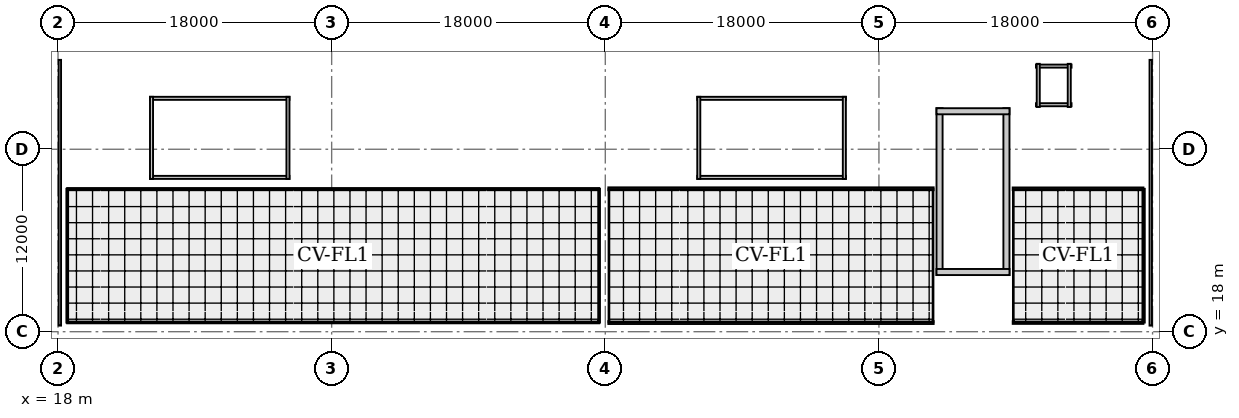
"""IFC4 building model, lengths in metres.
Left out: names, types, materials, properties, quantities, classifications, styles, units other than length and angle.
Written with IfcOpenShell. Run it as: python <this file> out.ifc"""

import sys

from ifc_helpers import new_model, si_unit, direction, frame, frame_2d, origin, origin_2d, place, context, subcontext, project, spatial, rectangle, circle, extrude, element, fill, save


model = new_model("IFC4")
c1 = context("Model", 3, precision=1e-05, world=origin(), true_north=direction((0.0, 1.0)))
c2 = subcontext(c1, "Body", "Model", "MODEL_VIEW")
j1 = project(units=[si_unit("LENGTHUNIT", "METRE"), si_unit("PLANEANGLEUNIT", "RADIAN")], contexts=[c1])
p1 = place(None, origin())
s1 = spatial("IfcSite", under=j1, at=p1, CompositionType="ELEMENT")
p2 = place(p1, origin())
s2 = spatial("IfcBuilding", under=s1, at=p2, CompositionType="ELEMENT")
p3 = place(p2, frame((0.0, 0.0, 10.8)))
s3 = spatial("IfcBuildingStorey", under=s2, at=p3, CompositionType="ELEMENT", Elevation=10.8)
for number, where, z_axis, x_axis in (
    (1, (18.0, 18.0, 0.0), (0.0, 0.0, 1.0), (1.0, 0.0, 0.0)),
    (2, (18.0, 30.0, 0.0), (0.0, 0.0, 1.0), (1.0, 0.0, 0.0)),
    (3, (18.0, 36.0, 0.0), (0.0, 0.0, 1.0), (1.0, 0.0, 0.0)),
    (4, (36.0, 18.0, 0.0), (0.0, 0.0, 1.0), (1.0, 0.0, 0.0)),
    (5, (36.0, 30.0, 0.0), (0.0, 0.0, 1.0), (1.0, 0.0, 0.0)),
    (6, (36.0, 36.0, 0.0), (0.0, 0.0, 1.0), (1.0, 0.0, 0.0)),
    (7, (54.0, 18.0, 0.0), (0.0, 0.0, 1.0), (1.0, 0.0, 0.0)),
    (8, (54.0, 30.0, 0.0), (0.0, 0.0, 1.0), (1.0, 0.0, 0.0)),
    (9, (54.0, 36.0, 0.0), (0.0, 0.0, 1.0), (1.0, 0.0, 0.0)),
    (10, (72.0, 18.0, 0.0), (0.0, 0.0, 1.0), (1.0, 0.0, 0.0)),
    (11, (72.0, 30.0, 0.0), (0.0, 0.0, 1.0), (1.0, 0.0, 0.0)),
    (12, (72.0, 36.0, 0.0), (0.0, 0.0, 1.0), (1.0, 0.0, 0.0)),
    (13, (90.0, 18.0, 0.0), (0.0, 0.0, 1.0), (1.0, 0.0, 0.0)),
    (14, (90.0, 30.0, 0.0), (0.0, 0.0, 1.0), (1.0, 0.0, 0.0)),
    (15, (90.0, 36.0, 0.0), (0.0, 0.0, 1.0), (1.0, 0.0, 0.0)),
):
    element("IfcColumn", number, at=place(p3, frame(where, z_axis=z_axis, x_axis=x_axis)), inside=s3, PredefinedType="COLUMN", context=c2, shape_type="SweptSolid", body=[
        extrude(circle(Radius=0.35, at=origin_2d()), origin(), (0.0, 0.0, 1.0), 3.35),
    ])
for number, where, z_axis, x_axis in (
    (16, (18.12, 18.4, 0.0), (0.0, 0.0, 1.0), (0.0, 1.0, 0.0)),
    (17, (89.88, 18.4, 0.0), (0.0, 0.0, 1.0), (0.0, 1.0, 0.0)),
):
    element("IfcWall", number, at=place(p3, frame(where, z_axis=z_axis, x_axis=x_axis)), inside=s3, PredefinedType="PARTITIONING", context=c2, shape_type="SweptSolid", body=[
        extrude(rectangle(XDim=17.48, YDim=0.16, at=frame_2d((8.74, 0.0))), origin(), (0.0, 0.0, 1.0), 2.15),
    ])
for number, where, z_axis, x_axis in (
    (18, (80.387, 21.725, 0.0), (0.0, 0.0, 1.0), (0.0, 1.0, 0.0)),
    (19, (75.988, 32.7, 0.0), (0.0, 0.0, 1.0), (0.0, -1.0, 0.0)),
):
    element("IfcWall", number, at=place(p3, frame(where, z_axis=z_axis, x_axis=x_axis)), inside=s3, PredefinedType="SHEAR", context=c2, shape_type="SweptSolid", body=[
        extrude(rectangle(XDim=10.975, YDim=0.4, at=frame_2d((5.487, 0.0))), origin(), (0.0, 0.0, 1.0), 3.3),
    ])
p4 = place(p3, frame((80.587, 32.5, 0.0), z_axis=(0.0, 0.0, 1.0), x_axis=(-1.0, 0.0, 0.0)))
e20 = element("IfcWall", 20, at=p4, inside=s3, PredefinedType="SHEAR", context=c2, shape_type="SweptSolid", body=[
    extrude(rectangle(XDim=4.8, YDim=0.4, at=frame_2d((2.4, 0.0))), origin(), (0.0, 0.0, 1.0), 3.3),
])
p5 = place(p3, frame((75.788, 21.925, 0.0), z_axis=(0.0, 0.0, 1.0), x_axis=(1.0, 0.0, 0.0)))
e21 = element("IfcWall", 21, at=p5, inside=s3, PredefinedType="SHEAR", context=c2, shape_type="SweptSolid", body=[
    extrude(rectangle(XDim=4.8, YDim=0.4, at=frame_2d((2.4, 0.0))), origin(), (0.0, 0.0, 1.0), 3.3),
])
p6 = place(p5, frame((1.1, 0.0, 0.0)))
e22 = element("IfcOpeningElement", 22, at=p6, cuts=e21, PredefinedType="OPENING", context=c2, shape_type="SweptSolid", body=[
    extrude(rectangle(XDim=1.3, YDim=2.1, at=frame_2d((0.65, 1.05))), frame((0.0, 0.21, 0.0), z_axis=(0.0, -1.0, 0.0), x_axis=(1.0, 0.0, 0.0)), (0.0, 0.0, 1.0), 0.42),
])
for number, where, z_axis, x_axis in (
    (23, (24.05, 28.15, 0.0), (0.0, 0.0, 1.0), (1.0, 0.0, 0.0)),
    (24, (33.225, 33.35, 0.0), (0.0, 0.0, 1.0), (-1.0, 0.0, 0.0)),
):
    element("IfcWall", number, at=place(p3, frame(where, z_axis=z_axis, x_axis=x_axis)), inside=s3, PredefinedType="SOLIDWALL", context=c2, shape_type="SweptSolid", body=[
        extrude(rectangle(XDim=9.175, YDim=0.2, at=frame_2d((4.587, 0.0))), origin(), (0.0, 0.0, 1.0), 2.45),
    ])
p7 = place(p3, frame((33.125, 28.05, 0.0), z_axis=(0.0, 0.0, 1.0), x_axis=(0.0, 1.0, 0.0)))
e25 = element("IfcWall", 25, at=p7, inside=s3, PredefinedType="SOLIDWALL", context=c2, shape_type="SweptSolid", body=[
    extrude(rectangle(XDim=5.4, YDim=0.2, at=frame_2d((2.7, 0.0))), origin(), (0.0, 0.0, 1.0), 2.45),
])
p8 = place(p3, frame((24.15, 33.45, 0.0), z_axis=(0.0, 0.0, 1.0), x_axis=(0.0, -1.0, 0.0)))
e26 = element("IfcWall", 26, at=p8, inside=s3, PredefinedType="SOLIDWALL", context=c2, shape_type="SweptSolid", body=[
    extrude(rectangle(XDim=5.4, YDim=0.2, at=frame_2d((2.7, 0.0))), origin(), (0.0, 0.0, 1.0), 2.45),
])
p9 = place(p8, frame((1.9, 0.0, 0.0)))
e27 = element("IfcOpeningElement", 27, at=p9, cuts=e26, PredefinedType="OPENING", context=c2, shape_type="SweptSolid", body=[
    extrude(rectangle(XDim=1.6, YDim=2.15, at=frame_2d((0.8, 1.075))), frame((0.0, 0.11, 0.0), z_axis=(0.0, -1.0, 0.0), x_axis=(1.0, 0.0, 0.0)), (0.0, 0.0, 1.0), 0.22),
])
for number, where, z_axis, x_axis in (
    (28, (60.05, 28.15, 0.0), (0.0, 0.0, 1.0), (1.0, 0.0, 0.0)),
    (29, (69.825, 33.35, 0.0), (0.0, 0.0, 1.0), (-1.0, 0.0, 0.0)),
):
    element("IfcWall", number, at=place(p3, frame(where, z_axis=z_axis, x_axis=x_axis)), inside=s3, PredefinedType="SOLIDWALL", context=c2, shape_type="SweptSolid", body=[
        extrude(rectangle(XDim=9.775, YDim=0.2, at=frame_2d((4.887, 0.0))), origin(), (0.0, 0.0, 1.0), 2.45),
    ])
p10 = place(p3, frame((69.725, 28.05, 0.0), z_axis=(0.0, 0.0, 1.0), x_axis=(0.0, 1.0, 0.0)))
e30 = element("IfcWall", 30, at=p10, inside=s3, PredefinedType="SOLIDWALL", context=c2, shape_type="SweptSolid", body=[
    extrude(rectangle(XDim=5.4, YDim=0.2, at=frame_2d((2.7, 0.0))), origin(), (0.0, 0.0, 1.0), 2.45),
])
p11 = place(p3, frame((60.15, 33.45, 0.0), z_axis=(0.0, 0.0, 1.0), x_axis=(0.0, -1.0, 0.0)))
e31 = element("IfcWall", 31, at=p11, inside=s3, PredefinedType="SOLIDWALL", context=c2, shape_type="SweptSolid", body=[
    extrude(rectangle(XDim=5.4, YDim=0.2, at=frame_2d((2.7, 0.0))), origin(), (0.0, 0.0, 1.0), 2.45),
])
p12 = place(p11, frame((1.9, 0.0, 0.0)))
e32 = element("IfcOpeningElement", 32, at=p12, cuts=e31, PredefinedType="OPENING", context=c2, shape_type="SweptSolid", body=[
    extrude(rectangle(XDim=1.6, YDim=2.15, at=frame_2d((0.8, 1.075))), frame((0.0, 0.11, 0.0), z_axis=(0.0, -1.0, 0.0), x_axis=(1.0, 0.0, 0.0)), (0.0, 0.0, 1.0), 0.22),
])
for number, where, z_axis, x_axis in (
    (33, (82.33, 32.93, 0.0), (0.0, 0.0, 1.0), (1.0, 0.0, 0.0)),
    (34, (84.67, 35.47, 0.0), (0.0, 0.0, 1.0), (-1.0, 0.0, 0.0)),
):
    element("IfcWall", number, at=place(p3, frame(where, z_axis=z_axis, x_axis=x_axis)), inside=s3, PredefinedType="SOLIDWALL", context=c2, shape_type="SweptSolid", body=[
        extrude(rectangle(XDim=2.34, YDim=0.2, at=frame_2d((1.17, 0.0))), origin(), (0.0, 0.0, 1.0), 3.275),
    ])
p13 = place(p3, frame((82.48, 35.62, 0.0), z_axis=(0.0, 0.0, 1.0), x_axis=(0.0, -1.0, 0.0)))
e35 = element("IfcWall", 35, at=p13, inside=s3, PredefinedType="SOLIDWALL", context=c2, shape_type="SweptSolid", body=[
    extrude(rectangle(XDim=2.84, YDim=0.2, at=frame_2d((1.42, 0.0))), origin(), (0.0, 0.0, 1.0), 3.275),
])
p14 = place(p13, frame((0.87, 0.0, 0.0)))
e36 = element("IfcOpeningElement", 36, at=p14, cuts=e35, PredefinedType="OPENING", context=c2, shape_type="SweptSolid", body=[
    extrude(rectangle(XDim=1.1, YDim=2.15, at=frame_2d((0.55, 1.075))), frame((0.0, 0.11, 0.0), z_axis=(0.0, -1.0, 0.0), x_axis=(1.0, 0.0, 0.0)), (0.0, 0.0, 1.0), 0.22),
])
p15 = place(p3, frame((84.52, 32.78, 0.0), z_axis=(0.0, 0.0, 1.0), x_axis=(0.0, 1.0, 0.0)))
e37 = element("IfcWall", 37, at=p15, inside=s3, PredefinedType="SOLIDWALL", context=c2, shape_type="SweptSolid", body=[
    extrude(rectangle(XDim=2.84, YDim=0.2, at=frame_2d((1.42, 0.0))), origin(), (0.0, 0.0, 1.0), 3.275),
])
p16 = place(p3, frame((53.6, 18.6, 0.0), z_axis=(0.0, 0.0, 1.0), x_axis=(-1.0, 0.0, 0.0)))
e38 = element("IfcWall", 38, at=p16, inside=s3, PredefinedType="PARTITIONING", context=c2, shape_type="SweptSolid", body=[
    extrude(rectangle(XDim=35.0, YDim=0.1, at=frame_2d((17.5, 0.0))), origin(), (0.0, 0.0, 1.0), 3.275),
])
p17 = place(p3, frame((18.6, 27.4, 0.0), z_axis=(0.0, 0.0, 1.0), x_axis=(1.0, 0.0, 0.0)))
e39 = element("IfcWall", 39, at=p17, inside=s3, PredefinedType="PARTITIONING", context=c2, shape_type="SweptSolid", body=[
    extrude(rectangle(XDim=35.0, YDim=0.1, at=frame_2d((17.5, 0.0))), origin(), (0.0, 0.0, 1.0), 3.275),
])
p18 = place(p17, frame((16.675, 0.0, 0.0)))
e40 = element("IfcOpeningElement", 40, at=p18, cuts=e39, PredefinedType="OPENING", context=c2, shape_type="SweptSolid", body=[
    extrude(rectangle(XDim=1.65, YDim=2.1, at=frame_2d((0.825, 1.05))), frame((0.0, 0.06, 0.0), z_axis=(0.0, -1.0, 0.0), x_axis=(1.0, 0.0, 0.0)), (0.0, 0.0, 1.0), 0.12),
])
for number, where, z_axis, x_axis in (
    (41, (18.6, 18.6, 0.0), (0.0, 0.0, 1.0), (0.0, 1.0, 0.0)),
    (42, (53.6, 27.4, 0.0), (0.0, 0.0, 1.0), (0.0, -1.0, 0.0)),
):
    element("IfcWall", number, at=place(p3, frame(where, z_axis=z_axis, x_axis=x_axis)), inside=s3, PredefinedType="PARTITIONING", context=c2, shape_type="SweptSolid", body=[
        extrude(rectangle(XDim=8.8, YDim=0.1, at=frame_2d((4.4, 0.0))), origin(), (0.0, 0.0, 1.0), 3.275),
    ])
p19 = place(p3, frame((75.6, 18.6, 0.0), z_axis=(0.0, 0.0, 1.0), x_axis=(-1.0, 0.0, 0.0)))
e43 = element("IfcWall", 43, at=p19, inside=s3, PredefinedType="PARTITIONING", context=c2, shape_type="SweptSolid", body=[
    extrude(rectangle(XDim=21.4, YDim=0.19, at=frame_2d((10.7, 0.0))), origin(), (0.0, 0.0, 1.0), 3.275),
])
p20 = place(p3, frame((54.2, 27.4, 0.0), z_axis=(0.0, 0.0, 1.0), x_axis=(1.0, 0.0, 0.0)))
e44 = element("IfcWall", 44, at=p20, inside=s3, PredefinedType="PARTITIONING", context=c2, shape_type="SweptSolid", body=[
    extrude(rectangle(XDim=21.4, YDim=0.19, at=frame_2d((10.7, 0.0))), origin(), (0.0, 0.0, 1.0), 3.275),
])
p21 = place(p20, frame((9.875, 0.0, 0.0)))
e45 = element("IfcOpeningElement", 45, at=p21, cuts=e44, PredefinedType="OPENING", context=c2, shape_type="SweptSolid", body=[
    extrude(rectangle(XDim=1.65, YDim=2.1, at=frame_2d((0.825, 1.05))), frame((0.0, 0.105, 0.0), z_axis=(0.0, -1.0, 0.0), x_axis=(1.0, 0.0, 0.0)), (0.0, 0.0, 1.0), 0.21),
])
p22 = place(p3, frame((89.4, 18.6, 0.0), z_axis=(0.0, 0.0, 1.0), x_axis=(-1.0, 0.0, 0.0)))
e46 = element("IfcWall", 46, at=p22, inside=s3, PredefinedType="PARTITIONING", context=c2, shape_type="SweptSolid", body=[
    extrude(rectangle(XDim=8.6, YDim=0.175, at=frame_2d((4.3, 0.0))), origin(), (0.0, 0.0, 1.0), 3.275),
])
p23 = place(p3, frame((80.8, 27.4, 0.0), z_axis=(0.0, 0.0, 1.0), x_axis=(1.0, 0.0, 0.0)))
e47 = element("IfcWall", 47, at=p23, inside=s3, PredefinedType="PARTITIONING", context=c2, shape_type="SweptSolid", body=[
    extrude(rectangle(XDim=8.6, YDim=0.175, at=frame_2d((4.3, 0.0))), origin(), (0.0, 0.0, 1.0), 3.275),
])
p24 = place(p23, frame((3.625, 0.0, 0.0)))
e48 = element("IfcOpeningElement", 48, at=p24, cuts=e47, PredefinedType="OPENING", context=c2, shape_type="SweptSolid", body=[
    extrude(rectangle(XDim=1.35, YDim=2.1, at=frame_2d((0.675, 1.05))), frame((0.0, 0.097, 0.0), z_axis=(0.0, -1.0, 0.0), x_axis=(1.0, 0.0, 0.0)), (0.0, 0.0, 1.0), 0.195),
])
p25 = place(p3, frame((89.4, 27.4, 0.0), z_axis=(0.0, 0.0, 1.0), x_axis=(0.0, -1.0, 0.0)))
e49 = element("IfcWall", 49, at=p25, inside=s3, PredefinedType="PARTITIONING", context=c2, shape_type="SweptSolid", body=[
    extrude(rectangle(XDim=8.8, YDim=0.175, at=frame_2d((4.4, 0.0))), origin(), (0.0, 0.0, 1.0), 3.275),
])
p26 = place(p6, origin())
e50 = element("IfcDoor", 50, at=p26, inside=s3, OperationType="SINGLE_SWING_LEFT", PredefinedType="DOOR", context=c2, shape_type="SweptSolid", body=[
    extrude(rectangle(XDim=1.3, YDim=2.1, at=frame_2d((0.65, 1.05))), frame((0.0, 0.025, 0.0), z_axis=(0.0, -1.0, 0.0), x_axis=(1.0, 0.0, 0.0)), (0.0, 0.0, 1.0), 0.05),
])
fill(e22, e50)
p27 = place(p9, origin())
e51 = element("IfcDoor", 51, at=p27, inside=s3, OperationType="SINGLE_SWING_LEFT", PredefinedType="DOOR", context=c2, shape_type="SweptSolid", body=[
    extrude(rectangle(XDim=1.6, YDim=2.15, at=frame_2d((0.8, 1.075))), frame((0.0, 0.025, 0.0), z_axis=(0.0, -1.0, 0.0), x_axis=(1.0, 0.0, 0.0)), (0.0, 0.0, 1.0), 0.05),
])
fill(e27, e51)
p28 = place(p12, origin())
e52 = element("IfcDoor", 52, at=p28, inside=s3, OperationType="SINGLE_SWING_LEFT", PredefinedType="DOOR", context=c2, shape_type="SweptSolid", body=[
    extrude(rectangle(XDim=1.6, YDim=2.15, at=frame_2d((0.8, 1.075))), frame((0.0, 0.025, 0.0), z_axis=(0.0, -1.0, 0.0), x_axis=(1.0, 0.0, 0.0)), (0.0, 0.0, 1.0), 0.05),
])
fill(e32, e52)
p29 = place(p14, origin())
e53 = element("IfcDoor", 53, at=p29, inside=s3, OperationType="SLIDING_TO_LEFT", PredefinedType="DOOR", context=c2, shape_type="SweptSolid", body=[
    extrude(rectangle(XDim=1.1, YDim=2.15, at=frame_2d((0.55, 1.075))), frame((0.0, 0.025, 0.0), z_axis=(0.0, -1.0, 0.0), x_axis=(1.0, 0.0, 0.0)), (0.0, 0.0, 1.0), 0.05),
])
fill(e36, e53)
p30 = place(p18, origin())
e54 = element("IfcDoor", 54, at=p30, inside=s3, OperationType="SINGLE_SWING_RIGHT", PredefinedType="DOOR", context=c2, shape_type="SweptSolid", body=[
    extrude(rectangle(XDim=1.65, YDim=2.1, at=frame_2d((0.825, 1.05))), frame((0.0, 0.025, 0.0), z_axis=(0.0, -1.0, 0.0), x_axis=(1.0, 0.0, 0.0)), (0.0, 0.0, 1.0), 0.05),
])
fill(e40, e54)
p31 = place(p21, origin())
e55 = element("IfcDoor", 55, at=p31, inside=s3, OperationType="SINGLE_SWING_LEFT", PredefinedType="DOOR", context=c2, shape_type="SweptSolid", body=[
    extrude(rectangle(XDim=1.65, YDim=2.1, at=frame_2d((0.825, 1.05))), frame((0.0, 0.025, 0.0), z_axis=(0.0, -1.0, 0.0), x_axis=(1.0, 0.0, 0.0)), (0.0, 0.0, 1.0), 0.05),
])
fill(e45, e55)
p32 = place(p24, origin())
e56 = element("IfcDoor", 56, at=p32, inside=s3, OperationType="SINGLE_SWING_RIGHT", PredefinedType="DOOR", context=c2, shape_type="SweptSolid", body=[
    extrude(rectangle(XDim=1.35, YDim=2.1, at=frame_2d((0.675, 1.05))), frame((0.0, 0.025, 0.0), z_axis=(0.0, -1.0, 0.0), x_axis=(1.0, 0.0, 0.0)), (0.0, 0.0, 1.0), 0.05),
])
fill(e48, e56)
save(model, sys.argv[1])
